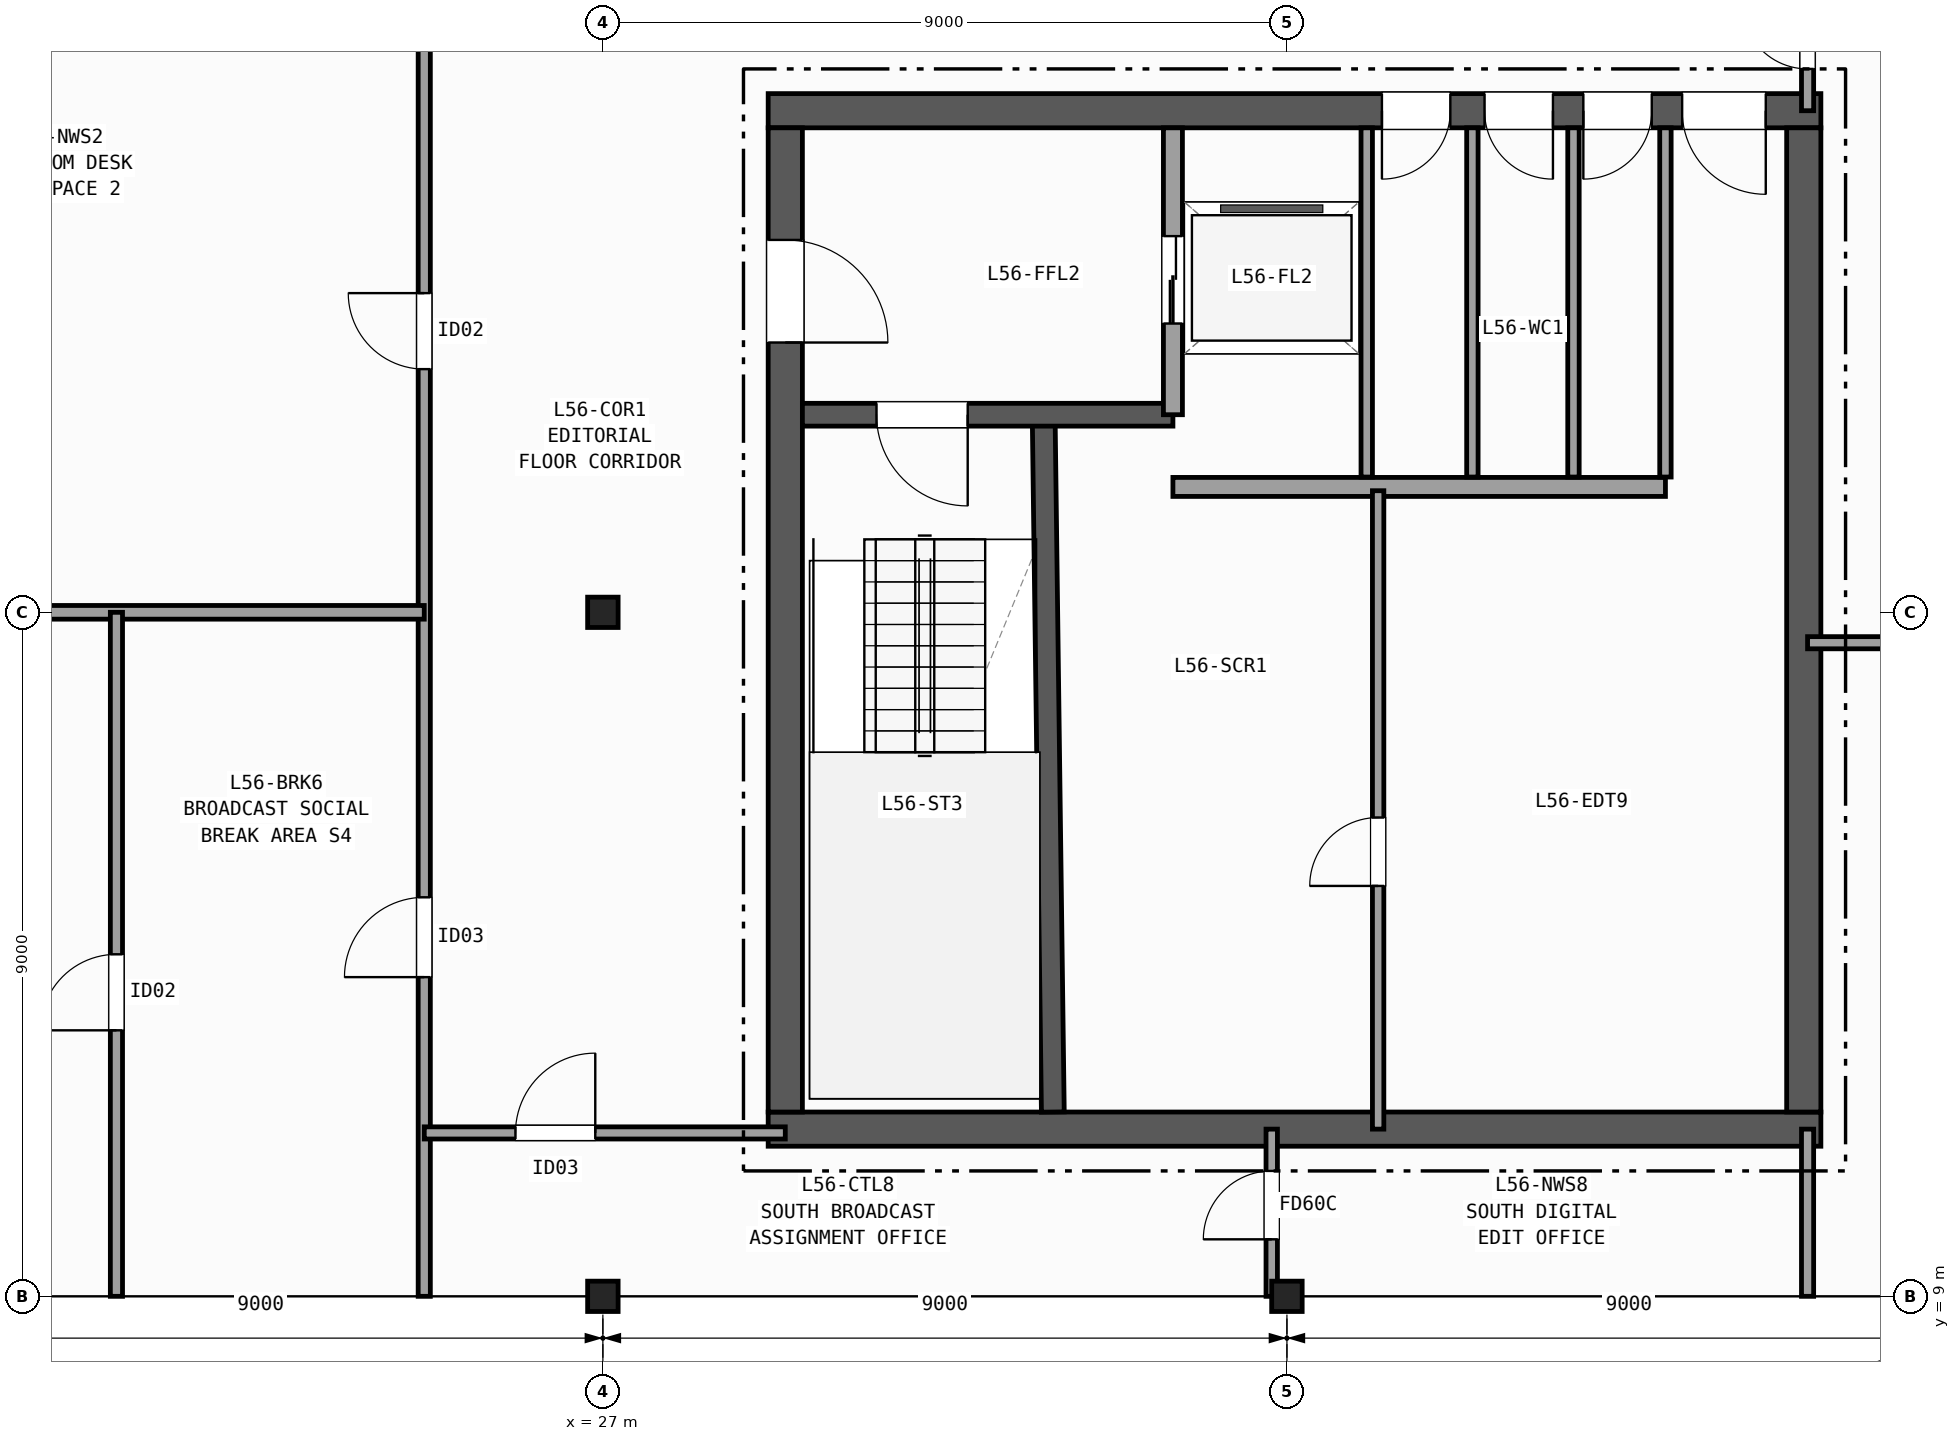
"""IFC4 building model, lengths in metres.
Left out: names, types, materials, properties, quantities, classifications, styles, units other than length and angle.
Written with IfcOpenShell. Run it as: python <this file> out.ifc"""

import sys

from ifc_helpers import new_model, si_unit, direction, frame, frame_2d, origin, origin_2d, place, context, subcontext, project, spatial, rectangle, i_section, extrude, element, fill, save


model = new_model("IFC4")
c1 = context("Model", 3, precision=1e-05, world=origin(), true_north=direction((0.0, 1.0)))
c2 = subcontext(c1, "Body", "Model", "MODEL_VIEW")
j1 = project(units=[si_unit("LENGTHUNIT", "METRE"), si_unit("PLANEANGLEUNIT", "RADIAN")], contexts=[c1])
p1 = place(None, origin())
s1 = spatial("IfcSite", under=j1, at=p1, CompositionType="ELEMENT")
p2 = place(p1, origin())
s2 = spatial("IfcBuilding", under=s1, at=p2, CompositionType="ELEMENT")
p3 = place(p2, frame((0.0, 0.0, 224.7)))
s3 = spatial("IfcBuildingStorey", under=s2, at=p3, CompositionType="ELEMENT", Elevation=224.7)
for number, where, z_axis, x_axis in (
    (1, (27.0, 9.0, 0.0), (0.0, 0.0, 1.0), (1.0, 0.0, 0.0)),
    (2, (27.0, 18.0, 0.0), (0.0, 0.0, 1.0), (1.0, 0.0, 0.0)),
    (3, (36.0, 9.0, 0.0), (0.0, 0.0, 1.0), (1.0, 0.0, 0.0)),
):
    element("IfcColumn", number, at=place(p3, frame(where, z_axis=z_axis, x_axis=x_axis)), inside=s3, PredefinedType="COLUMN", context=c2, shape_type="SweptSolid", body=[
        extrude(i_section(OverallWidth=0.401, OverallDepth=0.399, WebThickness=0.025, FlangeThickness=0.04, FilletRadius=0.015, at=origin_2d()), origin(), (0.0, 0.0, 1.0), 3.7),
    ])
p4 = place(p3, frame((29.175, 11.2, 0.0), z_axis=(0.0, 0.0, 1.0), x_axis=(1.0, 0.0, 0.0)))
e4 = element("IfcWall", 4, at=p4, inside=s3, PredefinedType="SHEAR", context=c2, shape_type="SweptSolid", body=[
    extrude(rectangle(XDim=13.85, YDim=0.45, at=frame_2d((6.925, 0.0))), origin(), (0.0, 0.0, 1.0), 3.42),
])
p5 = place(p3, frame((43.025, 24.6, 0.0), z_axis=(0.0, 0.0, 1.0), x_axis=(-1.0, 0.0, 0.0)))
e5 = element("IfcWall", 5, at=p5, inside=s3, PredefinedType="SHEAR", context=c2, shape_type="SweptSolid", body=[
    extrude(rectangle(XDim=13.85, YDim=0.45, at=frame_2d((6.925, 0.0))), origin(), (0.0, 0.0, 1.0), 3.42),
])
p6 = place(p5, frame((0.725, 0.0, 0.0)))
e6 = element("IfcOpeningElement", 6, at=p6, cuts=e5, PredefinedType="OPENING", context=c2, shape_type="SweptSolid", body=[
    extrude(rectangle(XDim=1.1, YDim=2.15, at=frame_2d((0.55, 1.075))), frame((0.0, 0.235, 0.0), z_axis=(0.0, -1.0, 0.0), x_axis=(1.0, 0.0, 0.0)), (0.0, 0.0, 1.0), 0.47),
])
p7 = place(p5, frame((2.225, 0.0, 0.0)))
e7 = element("IfcOpeningElement", 7, at=p7, cuts=e5, PredefinedType="OPENING", context=c2, shape_type="SweptSolid", body=[
    extrude(rectangle(XDim=0.9, YDim=2.1, at=frame_2d((0.45, 1.05))), frame((0.0, 0.235, 0.0), z_axis=(0.0, -1.0, 0.0), x_axis=(1.0, 0.0, 0.0)), (0.0, 0.0, 1.0), 0.47),
])
p8 = place(p5, frame((3.525, 0.0, 0.0)))
e8 = element("IfcOpeningElement", 8, at=p8, cuts=e5, PredefinedType="OPENING", context=c2, shape_type="SweptSolid", body=[
    extrude(rectangle(XDim=0.9, YDim=2.1, at=frame_2d((0.45, 1.05))), frame((0.0, 0.235, 0.0), z_axis=(0.0, -1.0, 0.0), x_axis=(1.0, 0.0, 0.0)), (0.0, 0.0, 1.0), 0.47),
])
p9 = place(p5, frame((4.875, 0.0, 0.0)))
e9 = element("IfcOpeningElement", 9, at=p9, cuts=e5, PredefinedType="OPENING", context=c2, shape_type="SweptSolid", body=[
    extrude(rectangle(XDim=0.9, YDim=2.1, at=frame_2d((0.45, 1.05))), frame((0.0, 0.235, 0.0), z_axis=(0.0, -1.0, 0.0), x_axis=(1.0, 0.0, 0.0)), (0.0, 0.0, 1.0), 0.47),
])
p10 = place(p3, frame((29.4, 24.375, 0.0), z_axis=(0.0, 0.0, 1.0), x_axis=(0.0, -1.0, 0.0)))
e10 = element("IfcWall", 10, at=p10, inside=s3, PredefinedType="SHEAR", context=c2, shape_type="SweptSolid", body=[
    extrude(rectangle(XDim=12.95, YDim=0.45, at=frame_2d((6.475, 0.0))), origin(), (0.0, 0.0, 1.0), 3.42),
])
p11 = place(p10, frame((1.475, 0.0, 0.0)))
e11 = element("IfcOpeningElement", 11, at=p11, cuts=e10, PredefinedType="OPENING", context=c2, shape_type="SweptSolid", body=[
    extrude(rectangle(XDim=1.35, YDim=2.15, at=frame_2d((0.675, 1.075))), frame((0.0, 0.235, 0.0), z_axis=(0.0, -1.0, 0.0), x_axis=(1.0, 0.0, 0.0)), (0.0, 0.0, 1.0), 0.47),
])
p12 = place(p3, frame((42.8, 11.425, 0.0), z_axis=(0.0, 0.0, 1.0), x_axis=(0.0, 1.0, 0.0)))
e12 = element("IfcWall", 12, at=p12, inside=s3, PredefinedType="SHEAR", context=c2, shape_type="SweptSolid", body=[
    extrude(rectangle(XDim=12.95, YDim=0.45, at=frame_2d((6.475, 0.0))), origin(), (0.0, 0.0, 1.0), 3.42),
])
p13 = place(p3, frame((32.92, 11.425, 0.0), z_axis=(0.0, 0.0, 1.0), x_axis=(-0.013135638869, 0.999913723774, 0.0)))
e13 = element("IfcWall", 13, at=p13, inside=s3, PredefinedType="SHEAR", context=c2, shape_type="SweptSolid", body=[
    extrude(rectangle(XDim=9.126, YDim=0.3, at=frame_2d((4.563, 0.0))), origin(), (0.0, 0.0, 1.0), 3.42),
])
p14 = place(p3, frame((34.5, 20.6, 0.0), z_axis=(0.0, 0.0, 1.0), x_axis=(-1.0, 0.0, 0.0)))
e14 = element("IfcWall", 14, at=p14, inside=s3, PredefinedType="SHEAR", context=c2, shape_type="SweptSolid", body=[
    extrude(rectangle(XDim=4.875, YDim=0.3, at=frame_2d((2.438, 0.0))), origin(), (0.0, 0.0, 1.0), 3.42),
])
p15 = place(p14, frame((2.7, 0.0, 0.0)))
e15 = element("IfcOpeningElement", 15, at=p15, cuts=e14, PredefinedType="OPENING", context=c2, shape_type="SweptSolid", body=[
    extrude(rectangle(XDim=1.2, YDim=2.15, at=frame_2d((0.6, 1.075))), frame((0.0, 0.16, 0.0), z_axis=(0.0, -1.0, 0.0), x_axis=(1.0, 0.0, 0.0)), (0.0, 0.0, 1.0), 0.32),
])
p16 = place(p3, frame((34.5, 20.6, 0.0), z_axis=(0.0, 0.0, 1.0), x_axis=(0.0, 1.0, 0.0)))
e16 = element("IfcWall", 16, at=p16, inside=s3, PredefinedType="PARTITIONING", context=c2, shape_type="SweptSolid", body=[
    extrude(rectangle(XDim=3.775, YDim=0.25, at=frame_2d((1.887, 0.0))), origin(), (0.0, 0.0, 1.0), 3.42),
])
p17 = place(p16, frame((1.2, 0.0, 0.0)))
e17 = element("IfcOpeningElement", 17, at=p17, cuts=e16, PredefinedType="OPENING", context=c2, shape_type="SweptSolid", body=[
    extrude(rectangle(XDim=1.15, YDim=2.15, at=frame_2d((0.575, 1.075))), frame((0.0, 0.135, 0.0), z_axis=(0.0, -1.0, 0.0), x_axis=(1.0, 0.0, 0.0)), (0.0, 0.0, 1.0), 0.27),
])
p18 = place(p3, frame((34.5, 19.65, 0.0), z_axis=(0.0, 0.0, 1.0), x_axis=(1.0, 0.0, 0.0)))
e18 = element("IfcWall", 18, at=p18, inside=s3, PredefinedType="PARTITIONING", context=c2, shape_type="SweptSolid", body=[
    extrude(rectangle(XDim=6.48, YDim=0.25, at=frame_2d((3.24, 0.0))), origin(), (0.0, 0.0, 1.0), 3.42),
])
p19 = place(p3, frame((37.2, 11.2, 0.0), z_axis=(0.0, 0.0, 1.0), x_axis=(0.0, 1.0, 0.0)))
e19 = element("IfcWall", 19, at=p19, inside=s3, PredefinedType="PARTITIONING", context=c2, shape_type="SweptSolid", body=[
    extrude(rectangle(XDim=8.4, YDim=0.15, at=frame_2d((4.2, 0.0))), origin(), (0.0, 0.0, 1.0), 3.42),
])
p20 = place(p19, frame((3.2, 0.0, 0.0)))
e20 = element("IfcOpeningElement", 20, at=p20, cuts=e19, PredefinedType="OPENING", context=c2, shape_type="SweptSolid", body=[
    extrude(rectangle(XDim=0.9, YDim=2.1, at=frame_2d((0.45, 1.05))), frame((0.0, 0.085, 0.0), z_axis=(0.0, -1.0, 0.0), x_axis=(1.0, 0.0, 0.0)), (0.0, 0.0, 1.0), 0.17),
])
for number, where, z_axis, x_axis in (
    (21, (37.05, 19.78, 0.0), (0.0, 0.0, 1.0), (0.0, 1.0, 0.0)),
    (22, (38.44, 19.78, 0.0), (0.0, 0.0, 1.0), (0.0, 1.0, 0.0)),
    (23, (39.77, 19.78, 0.0), (0.0, 0.0, 1.0), (0.0, 1.0, 0.0)),
    (24, (40.98, 19.78, 0.0), (0.0, 0.0, 1.0), (0.0, 1.0, 0.0)),
):
    element("IfcWall", number, at=place(p3, frame(where, z_axis=z_axis, x_axis=x_axis)), inside=s3, PredefinedType="PARTITIONING", context=c2, shape_type="SweptSolid", body=[
        extrude(rectangle(XDim=4.595, YDim=0.15, at=frame_2d((2.297, 0.0))), origin(), (0.0, 0.0, 1.0), 3.42),
    ])
p21 = place(p3, frame((24.65, 9.0, 0.0), z_axis=(0.0, 0.0, 1.0), x_axis=(0.0, 1.0, 0.0)))
e25 = element("IfcWall", 25, at=p21, inside=s3, PredefinedType="PARTITIONING", context=c2, shape_type="SweptSolid", body=[
    extrude(rectangle(XDim=19.2, YDim=0.16, at=frame_2d((9.6, 0.0))), origin(), (0.0, 0.0, 1.0), 2.707),
])
p22 = place(p21, frame((12.2, 0.0, 0.0)))
e26 = element("IfcOpeningElement", 26, at=p22, cuts=e25, PredefinedType="OPENING", context=c2, shape_type="SweptSolid", body=[
    extrude(rectangle(XDim=1.0, YDim=2.1, at=frame_2d((0.5, 1.05))), frame((0.0, 0.09, 0.0), z_axis=(0.0, -1.0, 0.0), x_axis=(1.0, 0.0, 0.0)), (0.0, 0.0, 1.0), 0.18),
])
p23 = place(p21, frame((4.2, 0.0, 0.0)))
e27 = element("IfcOpeningElement", 27, at=p23, cuts=e25, PredefinedType="OPENING", context=c2, shape_type="SweptSolid", body=[
    extrude(rectangle(XDim=1.05, YDim=2.15, at=frame_2d((0.525, 1.075))), frame((0.0, 0.09, 0.0), z_axis=(0.0, -1.0, 0.0), x_axis=(1.0, 0.0, 0.0)), (0.0, 0.0, 1.0), 0.18),
])
p24 = place(p3, frame((9.0, 18.0, 0.0), z_axis=(0.0, 0.0, 1.0), x_axis=(1.0, 0.0, 0.0)))
e28 = element("IfcWall", 28, at=p24, inside=s3, PredefinedType="PARTITIONING", context=c2, shape_type="SweptSolid", body=[
    extrude(rectangle(XDim=15.65, YDim=0.18, at=frame_2d((7.825, 0.0))), origin(), (0.0, 0.0, 1.0), 2.707),
])
p25 = place(p3, frame((20.6, 9.0, 0.0), z_axis=(0.0, 0.0, 1.0), x_axis=(0.0, 1.0, 0.0)))
e29 = element("IfcWall", 29, at=p25, inside=s3, PredefinedType="PARTITIONING", context=c2, shape_type="SweptSolid", body=[
    extrude(rectangle(XDim=9.0, YDim=0.16, at=frame_2d((4.5, 0.0))), origin(), (0.0, 0.0, 1.0), 2.707),
])
p26 = place(p25, frame((3.5, 0.0, 0.0)))
e30 = element("IfcOpeningElement", 30, at=p26, cuts=e29, PredefinedType="OPENING", context=c2, shape_type="SweptSolid", body=[
    extrude(rectangle(XDim=1.0, YDim=2.1, at=frame_2d((0.5, 1.05))), frame((0.0, 0.09, 0.0), z_axis=(0.0, -1.0, 0.0), x_axis=(1.0, 0.0, 0.0)), (0.0, 0.0, 1.0), 0.18),
])
p27 = place(p3, frame((24.65, 11.15, 0.0), z_axis=(0.0, 0.0, 1.0), x_axis=(1.0, 0.0, 0.0)))
e31 = element("IfcWall", 31, at=p27, inside=s3, PredefinedType="PARTITIONING", context=c2, shape_type="SweptSolid", body=[
    extrude(rectangle(XDim=4.75, YDim=0.16, at=frame_2d((2.375, 0.0))), origin(), (0.0, 0.0, 1.0), 2.792),
])
p28 = place(p27, frame((1.2, 0.0, 0.0)))
e32 = element("IfcOpeningElement", 32, at=p28, cuts=e31, PredefinedType="OPENING", context=c2, shape_type="SweptSolid", body=[
    extrude(rectangle(XDim=1.05, YDim=2.15, at=frame_2d((0.525, 1.075))), frame((0.0, 0.09, 0.0), z_axis=(0.0, -1.0, 0.0), x_axis=(1.0, 0.0, 0.0)), (0.0, 0.0, 1.0), 0.18),
])
p29 = place(p3, frame((35.8, 9.0, 0.0), z_axis=(0.0, 0.0, 1.0), x_axis=(0.0, 1.0, 0.0)))
e33 = element("IfcWall", 33, at=p29, inside=s3, PredefinedType="PARTITIONING", context=c2, shape_type="SweptSolid", body=[
    extrude(rectangle(XDim=2.2, YDim=0.15, at=frame_2d((1.1, 0.0))), origin(), (0.0, 0.0, 1.0), 2.707),
])
p30 = place(p29, frame((0.75, 0.0, 0.0)))
e34 = element("IfcOpeningElement", 34, at=p30, cuts=e33, PredefinedType="OPENING", context=c2, shape_type="SweptSolid", body=[
    extrude(rectangle(XDim=0.9, YDim=2.1, at=frame_2d((0.45, 1.05))), frame((0.0, 0.085, 0.0), z_axis=(0.0, -1.0, 0.0), x_axis=(1.0, 0.0, 0.0)), (0.0, 0.0, 1.0), 0.17),
])
p31 = place(p3, frame((42.85, 9.0, 0.0), z_axis=(0.0, 0.0, 1.0), x_axis=(0.0, 1.0, 0.0)))
e35 = element("IfcWall", 35, at=p31, inside=s3, PredefinedType="PARTITIONING", context=c2, shape_type="SweptSolid", body=[
    extrude(rectangle(XDim=2.2, YDim=0.16, at=frame_2d((1.1, 0.0))), origin(), (0.0, 0.0, 1.0), 2.707),
])
p32 = place(p3, frame((42.85, 24.6, 0.0), z_axis=(0.0, 0.0, 1.0), x_axis=(0.0, 1.0, 0.0)))
e36 = element("IfcWall", 36, at=p32, inside=s3, PredefinedType="PARTITIONING", context=c2, shape_type="SweptSolid", body=[
    extrude(rectangle(XDim=2.4, YDim=0.16, at=frame_2d((1.2, 0.0))), origin(), (0.0, 0.0, 1.0), 2.707),
])
p33 = place(p32, frame((0.55, 0.0, 0.0)))
e37 = element("IfcOpeningElement", 37, at=p33, cuts=e36, PredefinedType="OPENING", context=c2, shape_type="SweptSolid", body=[
    extrude(rectangle(XDim=0.86, YDim=2.05, at=frame_2d((0.43, 1.025))), frame((0.0, 0.09, 0.0), z_axis=(0.0, -1.0, 0.0), x_axis=(1.0, 0.0, 0.0)), (0.0, 0.0, 1.0), 0.18),
])
p34 = place(p3, frame((42.85, 17.6, 0.0), z_axis=(0.0, 0.0, 1.0), x_axis=(1.0, 0.0, 0.0)))
e38 = element("IfcWall", 38, at=p34, inside=s3, PredefinedType="PARTITIONING", context=c2, shape_type="SweptSolid", body=[
    extrude(rectangle(XDim=11.15, YDim=0.16, at=frame_2d((5.575, 0.0))), origin(), (0.0, 0.0, 1.0), 3.42),
])
p35 = place(p34, frame((2.95, 0.0, 0.0)))
e39 = element("IfcOpeningElement", 39, at=p35, cuts=e38, PredefinedType="OPENING", context=c2, shape_type="SweptSolid", body=[
    extrude(rectangle(XDim=0.95, YDim=2.1, at=frame_2d((0.475, 1.05))), frame((0.0, 0.09, 0.0), z_axis=(0.0, -1.0, 0.0), x_axis=(1.0, 0.0, 0.0)), (0.0, 0.0, 1.0), 0.18),
])
p36 = place(p15, origin())
e40 = element("IfcDoor", 40, at=p36, inside=s3, OperationType="SINGLE_SWING_LEFT", PredefinedType="DOOR", context=c2, shape_type="SweptSolid", body=[
    extrude(rectangle(XDim=1.2, YDim=2.15, at=frame_2d((0.6, 1.075))), frame((0.0, 0.025, 0.0), z_axis=(0.0, -1.0, 0.0), x_axis=(1.0, 0.0, 0.0)), (0.0, 0.0, 1.0), 0.05),
])
fill(e15, e40)
p37 = place(p11, origin())
e41 = element("IfcDoor", 41, at=p37, inside=s3, OperationType="SINGLE_SWING_RIGHT", PredefinedType="DOOR", context=c2, shape_type="SweptSolid", body=[
    extrude(rectangle(XDim=1.35, YDim=2.15, at=frame_2d((0.675, 1.075))), frame((0.0, 0.025, 0.0), z_axis=(0.0, -1.0, 0.0), x_axis=(1.0, 0.0, 0.0)), (0.0, 0.0, 1.0), 0.05),
])
fill(e11, e41)
p38 = place(p6, origin())
e42 = element("IfcDoor", 42, at=p38, inside=s3, OperationType="SINGLE_SWING_LEFT", PredefinedType="DOOR", context=c2, shape_type="SweptSolid", body=[
    extrude(rectangle(XDim=1.1, YDim=2.15, at=frame_2d((0.55, 1.075))), frame((0.0, 0.025, 0.0), z_axis=(0.0, -1.0, 0.0), x_axis=(1.0, 0.0, 0.0)), (0.0, 0.0, 1.0), 0.05),
])
fill(e6, e42)
p39 = place(p7, origin())
e43 = element("IfcDoor", 43, at=p39, inside=s3, OperationType="SINGLE_SWING_RIGHT", PredefinedType="DOOR", context=c2, shape_type="SweptSolid", body=[
    extrude(rectangle(XDim=0.9, YDim=2.1, at=frame_2d((0.45, 1.05))), frame((0.0, 0.025, 0.0), z_axis=(0.0, -1.0, 0.0), x_axis=(1.0, 0.0, 0.0)), (0.0, 0.0, 1.0), 0.05),
])
fill(e7, e43)
p40 = place(p8, origin())
e44 = element("IfcDoor", 44, at=p40, inside=s3, OperationType="SINGLE_SWING_LEFT", PredefinedType="DOOR", context=c2, shape_type="SweptSolid", body=[
    extrude(rectangle(XDim=0.9, YDim=2.1, at=frame_2d((0.45, 1.05))), frame((0.0, 0.025, 0.0), z_axis=(0.0, -1.0, 0.0), x_axis=(1.0, 0.0, 0.0)), (0.0, 0.0, 1.0), 0.05),
])
fill(e8, e44)
p41 = place(p9, origin())
e45 = element("IfcDoor", 45, at=p41, inside=s3, OperationType="SINGLE_SWING_RIGHT", PredefinedType="DOOR", context=c2, shape_type="SweptSolid", body=[
    extrude(rectangle(XDim=0.9, YDim=2.1, at=frame_2d((0.45, 1.05))), frame((0.0, 0.025, 0.0), z_axis=(0.0, -1.0, 0.0), x_axis=(1.0, 0.0, 0.0)), (0.0, 0.0, 1.0), 0.05),
])
fill(e9, e45)
p42 = place(p17, origin())
e46 = element("IfcDoor", 46, at=p42, inside=s3, OperationType="DOUBLE_DOOR_SLIDING", PredefinedType="DOOR", context=c2, shape_type="SweptSolid", body=[
    extrude(rectangle(XDim=1.15, YDim=2.15, at=frame_2d((0.575, 1.075))), frame((0.0, 0.025, 0.0), z_axis=(0.0, -1.0, 0.0), x_axis=(1.0, 0.0, 0.0)), (0.0, 0.0, 1.0), 0.05),
])
fill(e17, e46)
p43 = place(p20, origin())
e47 = element("IfcDoor", 47, at=p43, inside=s3, OperationType="SINGLE_SWING_LEFT", PredefinedType="DOOR", context=c2, shape_type="SweptSolid", body=[
    extrude(rectangle(XDim=0.9, YDim=2.1, at=frame_2d((0.45, 1.05))), frame((0.0, 0.025, 0.0), z_axis=(0.0, -1.0, 0.0), x_axis=(1.0, 0.0, 0.0)), (0.0, 0.0, 1.0), 0.05),
])
fill(e20, e47)
p44 = place(p22, origin())
e48 = element("IfcDoor", 48, at=p44, inside=s3, OperationType="SINGLE_SWING_RIGHT", PredefinedType="DOOR", context=c2, shape_type="SweptSolid", body=[
    extrude(rectangle(XDim=1.0, YDim=2.1, at=frame_2d((0.5, 1.05))), frame((0.0, 0.025, 0.0), z_axis=(0.0, -1.0, 0.0), x_axis=(1.0, 0.0, 0.0)), (0.0, 0.0, 1.0), 0.05),
])
fill(e26, e48)
p45 = place(p23, origin())
e49 = element("IfcDoor", 49, at=p45, inside=s3, OperationType="SINGLE_SWING_LEFT", PredefinedType="DOOR", context=c2, shape_type="SweptSolid", body=[
    extrude(rectangle(XDim=1.05, YDim=2.15, at=frame_2d((0.525, 1.075))), frame((0.0, 0.025, 0.0), z_axis=(0.0, -1.0, 0.0), x_axis=(1.0, 0.0, 0.0)), (0.0, 0.0, 1.0), 0.05),
])
fill(e27, e49)
p46 = place(p26, origin())
e50 = element("IfcDoor", 50, at=p46, inside=s3, OperationType="SINGLE_SWING_LEFT", PredefinedType="DOOR", context=c2, shape_type="SweptSolid", body=[
    extrude(rectangle(XDim=1.0, YDim=2.1, at=frame_2d((0.5, 1.05))), frame((0.0, 0.025, 0.0), z_axis=(0.0, -1.0, 0.0), x_axis=(1.0, 0.0, 0.0)), (0.0, 0.0, 1.0), 0.05),
])
fill(e30, e50)
p47 = place(p28, origin())
e51 = element("IfcDoor", 51, at=p47, inside=s3, OperationType="SINGLE_SWING_RIGHT", PredefinedType="DOOR", context=c2, shape_type="SweptSolid", body=[
    extrude(rectangle(XDim=1.05, YDim=2.15, at=frame_2d((0.525, 1.075))), frame((0.0, 0.025, 0.0), z_axis=(0.0, -1.0, 0.0), x_axis=(1.0, 0.0, 0.0)), (0.0, 0.0, 1.0), 0.05),
])
fill(e32, e51)
p48 = place(p30, origin())
e52 = element("IfcDoor", 52, at=p48, inside=s3, OperationType="SINGLE_SWING_LEFT", PredefinedType="DOOR", context=c2, shape_type="SweptSolid", body=[
    extrude(rectangle(XDim=0.9, YDim=2.1, at=frame_2d((0.45, 1.05))), frame((0.0, 0.025, 0.0), z_axis=(0.0, -1.0, 0.0), x_axis=(1.0, 0.0, 0.0)), (0.0, 0.0, 1.0), 0.05),
])
fill(e34, e52)
p49 = place(p33, origin())
e53 = element("IfcDoor", 53, at=p49, inside=s3, OperationType="SINGLE_SWING_RIGHT", PredefinedType="DOOR", context=c2, shape_type="SweptSolid", body=[
    extrude(rectangle(XDim=0.86, YDim=2.05, at=frame_2d((0.43, 1.025))), frame((0.0, 0.025, 0.0), z_axis=(0.0, -1.0, 0.0), x_axis=(1.0, 0.0, 0.0)), (0.0, 0.0, 1.0), 0.05),
])
fill(e37, e53)
save(model, sys.argv[1])
